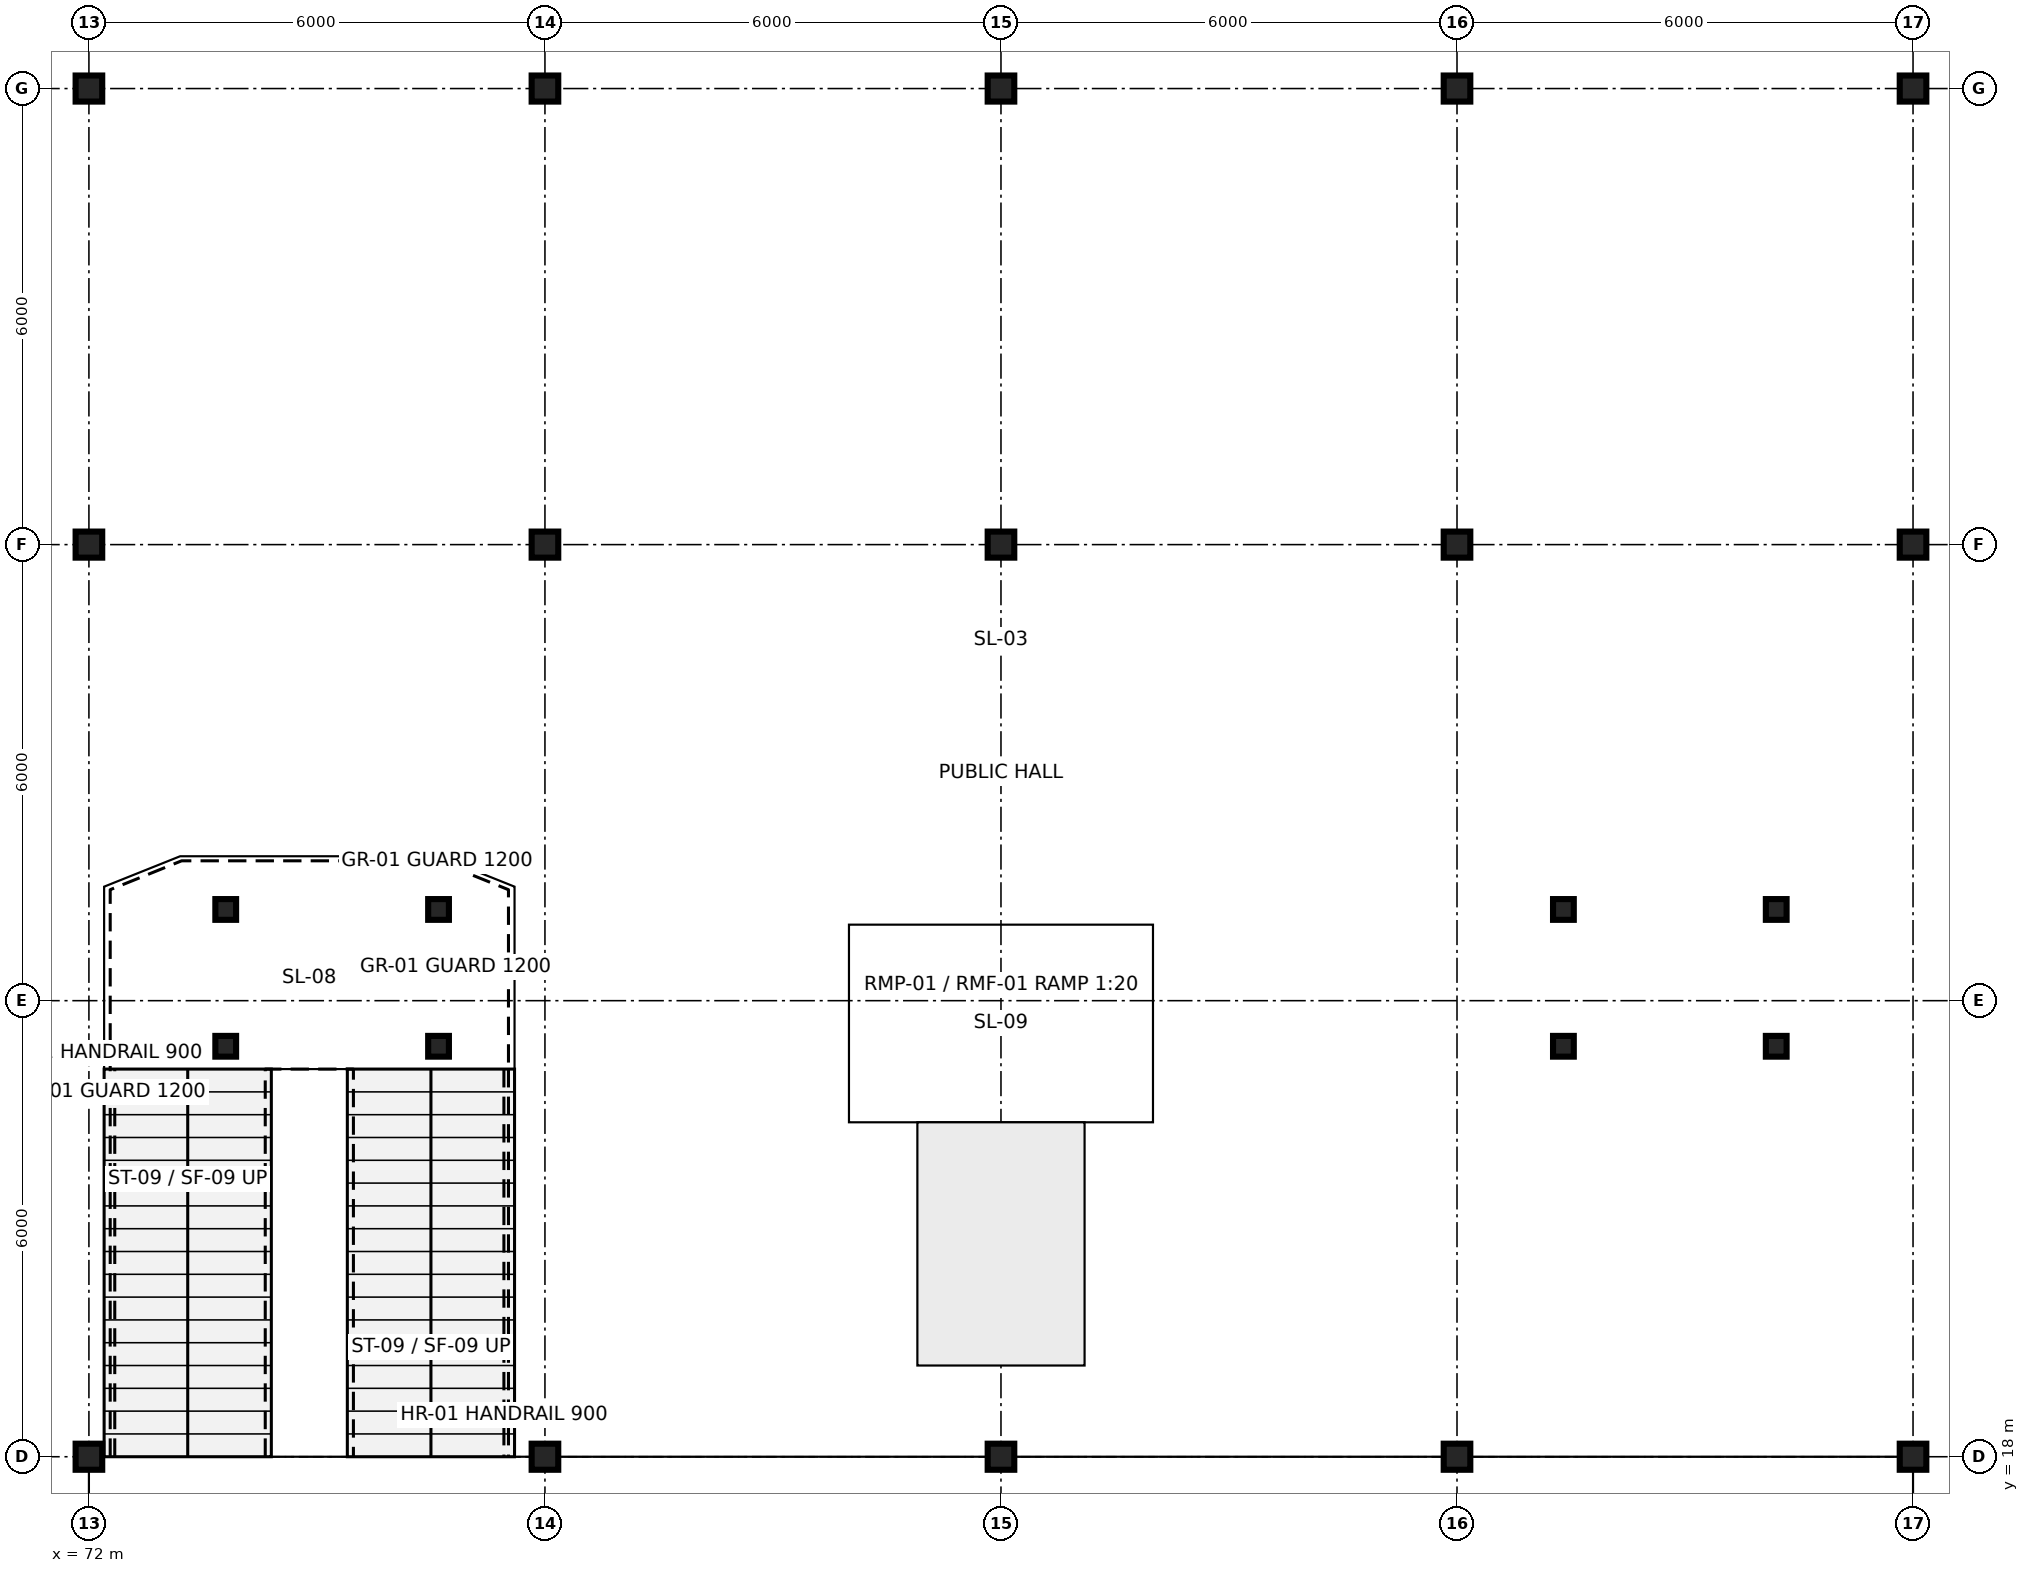
"""IFC4 building model, lengths in metres.
Left out: names, types, materials, properties, quantities, classifications, styles, units other than length and angle.
Written with IfcOpenShell. Run it as: python <this file> out.ifc"""

import sys

from ifc_helpers import new_model, si_unit, direction, frame, origin, origin_2d, place, context, subcontext, project, spatial, hollow_circle, i_section, extrude, element, save


model = new_model("IFC4")
c1 = context("Model", 3, precision=1e-05, world=origin(), true_north=direction((0.0, 1.0)))
c2 = subcontext(c1, "Body", "Model", "MODEL_VIEW")
j1 = project(units=[si_unit("LENGTHUNIT", "METRE"), si_unit("PLANEANGLEUNIT", "RADIAN")], contexts=[c1])
p1 = place(None, origin())
s1 = spatial("IfcSite", under=j1, at=p1, CompositionType="ELEMENT")
p2 = place(p1, origin())
s2 = spatial("IfcBuilding", under=s1, at=p2, CompositionType="ELEMENT")
p3 = place(p2, origin())
s3 = spatial("IfcBuildingStorey", under=s2, at=p3, CompositionType="ELEMENT", Elevation=0.0)
for number, where, z_axis, x_axis in (
    (1, (72.0, 18.0, 0.0), (0.0, 0.0, 1.0), (1.0, 0.0, 0.0)),
    (2, (78.0, 18.0, 0.0), (0.0, 0.0, 1.0), (1.0, 0.0, 0.0)),
    (3, (84.0, 18.0, 0.0), (0.0, 0.0, 1.0), (1.0, 0.0, 0.0)),
    (4, (90.0, 18.0, 0.0), (0.0, 0.0, 1.0), (1.0, 0.0, 0.0)),
    (5, (96.0, 18.0, 0.0), (0.0, 0.0, 1.0), (1.0, 0.0, 0.0)),
    (6, (72.0, 30.0, 0.0), (0.0, 0.0, 1.0), (1.0, 0.0, 0.0)),
):
    element("IfcColumn", number, at=place(p3, frame(where, z_axis=z_axis, x_axis=x_axis)), inside=s3, PredefinedType="COLUMN", context=c2, shape_type="SweptSolid", body=[
        extrude(i_section(OverallWidth=0.35, OverallDepth=0.343, WebThickness=0.01, FlangeThickness=0.015, FilletRadius=0.02, at=origin_2d()), origin(), (0.0, 0.0, 1.0), 6.0),
    ])
for number, where, z_axis, x_axis in (
    (7, (78.0, 30.0, 0.0), (0.0, 0.0, 1.0), (1.0, 0.0, 0.0)),
    (8, (84.0, 30.0, 0.0), (0.0, 0.0, 1.0), (1.0, 0.0, 0.0)),
    (9, (90.0, 30.0, 0.0), (0.0, 0.0, 1.0), (1.0, 0.0, 0.0)),
):
    element("IfcColumn", number, at=place(p3, frame(where, z_axis=z_axis, x_axis=x_axis)), inside=s3, PredefinedType="COLUMN", context=c2, shape_type="SweptSolid", body=[
        extrude(i_section(OverallWidth=0.35, OverallDepth=0.343, WebThickness=0.01, FlangeThickness=0.015, FilletRadius=0.02, at=origin_2d()), origin(), (0.0, 0.0, 1.0), 5.76),
    ])
for number, where, z_axis, x_axis in (
    (10, (96.0, 30.0, 0.0), (0.0, 0.0, 1.0), (1.0, 0.0, 0.0)),
    (11, (72.0, 36.0, 0.0), (0.0, 0.0, 1.0), (1.0, 0.0, 0.0)),
    (12, (78.0, 36.0, 0.0), (0.0, 0.0, 1.0), (1.0, 0.0, 0.0)),
    (13, (84.0, 36.0, 0.0), (0.0, 0.0, 1.0), (1.0, 0.0, 0.0)),
    (14, (90.0, 36.0, 0.0), (0.0, 0.0, 1.0), (1.0, 0.0, 0.0)),
    (15, (96.0, 36.0, 0.0), (0.0, 0.0, 1.0), (1.0, 0.0, 0.0)),
):
    element("IfcColumn", number, at=place(p3, frame(where, z_axis=z_axis, x_axis=x_axis)), inside=s3, PredefinedType="COLUMN", context=c2, shape_type="SweptSolid", body=[
        extrude(i_section(OverallWidth=0.35, OverallDepth=0.343, WebThickness=0.01, FlangeThickness=0.015, FilletRadius=0.02, at=origin_2d()), origin(), (0.0, 0.0, 1.0), 6.0),
    ])
for number, where, z_axis, x_axis in (
    (16, (73.8, 23.4, 0.0), (0.0, 0.0, 1.0), (1.0, 0.0, 0.0)),
    (17, (73.8, 25.2, 0.0), (0.0, 0.0, 1.0), (1.0, 0.0, 0.0)),
    (18, (76.6, 23.4, 0.0), (0.0, 0.0, 1.0), (1.0, 0.0, 0.0)),
    (19, (76.6, 25.2, 0.0), (0.0, 0.0, 1.0), (1.0, 0.0, 0.0)),
):
    element("IfcColumn", number, at=place(p3, frame(where, z_axis=z_axis, x_axis=x_axis)), inside=s3, PredefinedType="COLUMN", context=c2, shape_type="SweptSolid", body=[
        extrude(hollow_circle(Radius=0.136, WallThickness=0.01, at=origin_2d()), origin(), (0.0, 0.0, 1.0), 2.8),
    ])
for number, where, z_axis, x_axis in (
    (20, (91.4, 23.4, 0.0), (0.0, 0.0, 1.0), (1.0, 0.0, 0.0)),
    (21, (91.4, 25.2, 0.0), (0.0, 0.0, 1.0), (1.0, 0.0, 0.0)),
    (22, (94.2, 23.4, 0.0), (0.0, 0.0, 1.0), (1.0, 0.0, 0.0)),
    (23, (94.2, 25.2, 0.0), (0.0, 0.0, 1.0), (1.0, 0.0, 0.0)),
):
    element("IfcColumn", number, at=place(p3, frame(where, z_axis=z_axis, x_axis=x_axis)), inside=s3, PredefinedType="COLUMN", context=c2, shape_type="SweptSolid", body=[
        extrude(hollow_circle(Radius=0.136, WallThickness=0.01, at=origin_2d()), origin(), (0.0, 0.0, 1.0), 6.0),
    ])
save(model, sys.argv[1])
